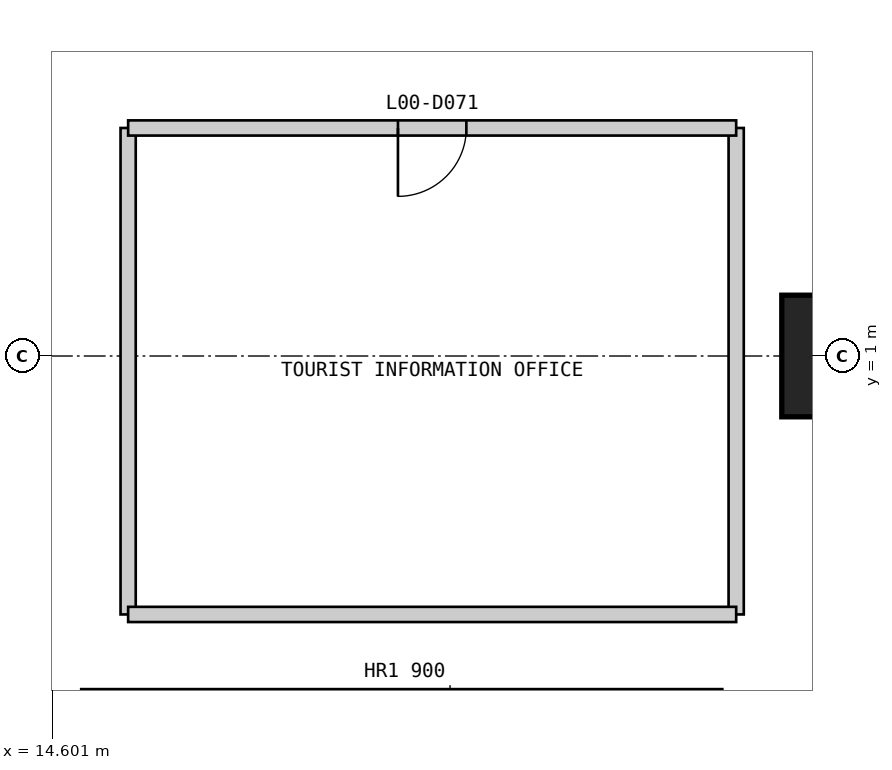
"""IFC4 building model, lengths in metres.
Left out: names, types, materials, properties, quantities, classifications, styles, units other than length and angle.
Written with IfcOpenShell. Run it as: python <this file> out.ifc"""

import sys

from ifc_helpers import new_model, si_unit, direction, frame, frame_2d, origin, origin_2d, place, context, subcontext, project, spatial, rectangle, extrude, element, fill, save


model = new_model("IFC4")
c1 = context("Model", 3, precision=1e-05, world=origin(), true_north=direction((0.0, 1.0)))
c2 = subcontext(c1, "Body", "Model", "MODEL_VIEW")
j1 = project(units=[si_unit("LENGTHUNIT", "METRE"), si_unit("PLANEANGLEUNIT", "RADIAN")], contexts=[c1])
p1 = place(None, origin())
s1 = spatial("IfcSite", under=j1, at=p1, CompositionType="ELEMENT")
p2 = place(p1, origin())
s2 = spatial("IfcBuilding", under=s1, at=p2, CompositionType="ELEMENT")
p3 = place(p2, origin())
s3 = spatial("IfcBuildingStorey", under=s2, at=p3, CompositionType="ELEMENT", Elevation=0.0)
p4 = place(p3, frame((25.0, 1.0, 0.0), z_axis=(0.0, 0.0, 1.0), x_axis=(1.0, 0.0, 0.0)))
e1 = element("IfcColumn", 1, at=p4, inside=s3, PredefinedType="COLUMN", context=c2, shape_type="SweptSolid", body=[
    extrude(rectangle(XDim=1.6, YDim=1.6, at=origin_2d()), origin(), (0.0, 0.0, 1.0), 7.0),
])
for number, where, z_axis, x_axis in (
    (2, (15.6, -2.4, 0.0), (0.0, 0.0, 1.0), (0.0, 1.0, 0.0)),
    (3, (23.6, -2.4, 0.0), (0.0, 0.0, 1.0), (0.0, 1.0, 0.0)),
):
    element("IfcWall", number, at=place(p3, frame(where, z_axis=z_axis, x_axis=x_axis)), inside=s3, PredefinedType="PARTITIONING", context=c2, shape_type="SweptSolid", body=[
        extrude(rectangle(XDim=6.4, YDim=0.2, at=frame_2d((3.2, 0.0))), origin(), (0.0, 0.0, 1.0), 6.7),
    ])
p5 = place(p3, frame((15.6, -2.4, 0.0), z_axis=(0.0, 0.0, 1.0), x_axis=(1.0, 0.0, 0.0)))
e4 = element("IfcWall", 4, at=p5, inside=s3, PredefinedType="PARTITIONING", context=c2, shape_type="SweptSolid", body=[
    extrude(rectangle(XDim=8.0, YDim=0.2, at=frame_2d((4.0, 0.0))), origin(), (0.0, 0.0, 1.0), 6.7),
])
p6 = place(p3, frame((15.6, 4.0, 0.0), z_axis=(0.0, 0.0, 1.0), x_axis=(1.0, 0.0, 0.0)))
e5 = element("IfcWall", 5, at=p6, inside=s3, PredefinedType="PARTITIONING", context=c2, shape_type="SweptSolid", body=[
    extrude(rectangle(XDim=8.0, YDim=0.2, at=frame_2d((4.0, 0.0))), origin(), (0.0, 0.0, 1.0), 6.7),
])
p7 = place(p6, frame((3.55, 0.0, 0.0)))
e6 = element("IfcOpeningElement", 6, at=p7, cuts=e5, PredefinedType="OPENING", context=c2, shape_type="SweptSolid", body=[
    extrude(rectangle(XDim=0.9, YDim=2.2, at=frame_2d((0.45, 1.1))), frame((0.0, 0.11, 0.0), z_axis=(0.0, -1.0, 0.0), x_axis=(1.0, 0.0, 0.0)), (0.0, 0.0, 1.0), 0.22),
])
p8 = place(p7, frame((0.9, 0.0, 0.0), z_axis=(0.0, 0.0, 1.0), x_axis=(-1.0, 0.0, 0.0)))
e7 = element("IfcDoor", 7, at=p8, inside=s3, OperationType="SINGLE_SWING_RIGHT", PredefinedType="DOOR", context=c2, shape_type="SweptSolid", body=[
    extrude(rectangle(XDim=0.9, YDim=2.2, at=frame_2d((0.45, 1.1))), frame((0.0, 0.025, 0.0), z_axis=(0.0, -1.0, 0.0), x_axis=(1.0, 0.0, 0.0)), (0.0, 0.0, 1.0), 0.05),
])
fill(e6, e7)
save(model, sys.argv[1])
